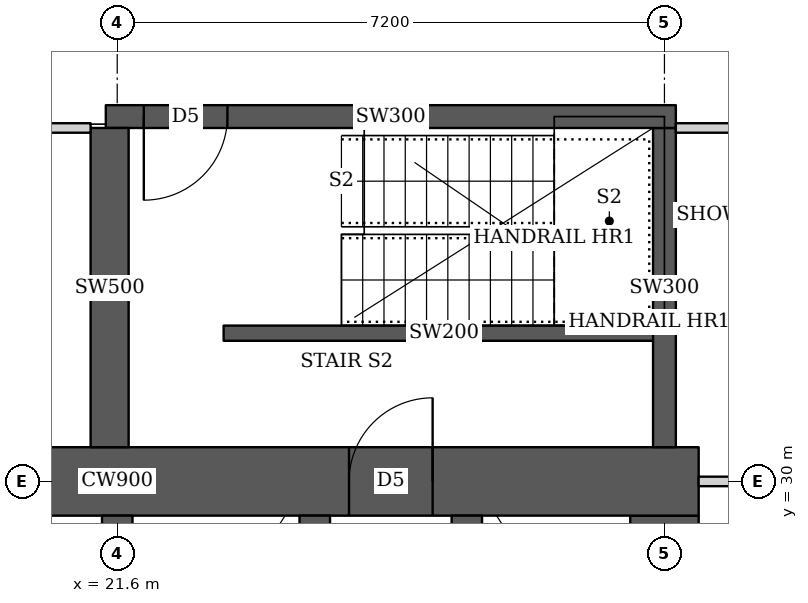
"""IFC4 building model, lengths in metres.
Left out: names, types, materials, properties, quantities, classifications, styles, units other than length and angle.
Written with IfcOpenShell. Run it as: python <this file> out.ifc"""

import sys

from ifc_helpers import new_model, si_unit, direction, frame, frame_2d, origin, place, context, subcontext, project, spatial, rectangle, extrude, element, fill, save


model = new_model("IFC4")
c1 = context("Model", 3, precision=1e-05, world=origin(), true_north=direction((0.0, 1.0)))
c2 = subcontext(c1, "Body", "Model", "MODEL_VIEW")
j1 = project(units=[si_unit("LENGTHUNIT", "METRE"), si_unit("PLANEANGLEUNIT", "RADIAN")], contexts=[c1])
p1 = place(None, origin())
s1 = spatial("IfcSite", under=j1, at=p1, CompositionType="ELEMENT")
p2 = place(p1, origin())
s2 = spatial("IfcBuilding", under=s1, at=p2, CompositionType="ELEMENT")
p3 = place(p2, frame((0.0, 0.0, 23.75)))
s3 = spatial("IfcBuildingStorey", under=s2, at=p3, CompositionType="ELEMENT", Elevation=23.75)
p4 = place(p3, frame((13.95, 30.0, 0.0), z_axis=(0.0, 0.0, 1.0), x_axis=(1.0, 0.0, 0.0)))
e1 = element("IfcWall", 1, at=p4, inside=s3, PredefinedType="SHEAR", context=c2, shape_type="SweptSolid", body=[
    extrude(rectangle(XDim=15.3, YDim=0.9, at=frame_2d((7.65, 0.0))), origin(), (0.0, 0.0, 1.0), 3.75),
])
p5 = place(p4, frame((4.45, 0.0, 0.0)))
e2 = element("IfcOpeningElement", 2, at=p5, cuts=e1, PredefinedType="OPENING", context=c2, shape_type="SweptSolid", body=[
    extrude(rectangle(XDim=1.8, YDim=2.1, at=frame_2d((0.9, 1.05))), frame((0.0, 0.46, 0.0), z_axis=(0.0, -1.0, 0.0), x_axis=(1.0, 0.0, 0.0)), (0.0, 0.0, 1.0), 0.92),
])
p6 = place(p4, frame((10.7, 0.0, 0.0)))
e3 = element("IfcOpeningElement", 3, at=p6, cuts=e1, PredefinedType="OPENING", context=c2, shape_type="SweptSolid", body=[
    extrude(rectangle(XDim=1.1, YDim=2.1, at=frame_2d((0.55, 1.05))), frame((0.0, 0.46, 0.0), z_axis=(0.0, -1.0, 0.0), x_axis=(1.0, 0.0, 0.0)), (0.0, 0.0, 1.0), 0.92),
])
p7 = place(p3, frame((28.8, 15.45, 0.0), z_axis=(0.0, 0.0, 1.0), x_axis=(0.0, 1.0, 0.0)))
e4 = element("IfcWall", 4, at=p7, inside=s3, PredefinedType="SHEAR", context=c2, shape_type="SweptSolid", body=[
    extrude(rectangle(XDim=14.1, YDim=0.9, at=frame_2d((7.05, 0.0))), origin(), (0.0, 0.0, 1.0), 3.75),
])
for number, where, z_axis, x_axis in (
    (5, (21.6, 15.45, 0.0), (0.0, 0.0, 1.0), (0.0, 1.0, 0.0)),
    (6, (24.2, 15.45, 0.0), (0.0, 0.0, 1.0), (0.0, 1.0, 0.0)),
):
    element("IfcWall", number, at=place(p3, frame(where, z_axis=z_axis, x_axis=x_axis)), inside=s3, PredefinedType="SHEAR", context=c2, shape_type="SweptSolid", body=[
        extrude(rectangle(XDim=14.1, YDim=0.4, at=frame_2d((7.05, 0.0))), origin(), (0.0, 0.0, 1.0), 3.75),
    ])
p8 = place(p3, frame((26.2, 26.45, 0.0), z_axis=(0.0, 0.0, 1.0), x_axis=(0.0, 1.0, 0.0)))
e7 = element("IfcWall", 7, at=p8, inside=s3, PredefinedType="SHEAR", context=c2, shape_type="SweptSolid", body=[
    extrude(rectangle(XDim=3.1, YDim=0.4, at=frame_2d((1.55, 0.0))), origin(), (0.0, 0.0, 1.0), 3.75),
])
p9 = place(p8, frame((1.075, 0.0, 0.0)))
e8 = element("IfcOpeningElement", 8, at=p9, cuts=e7, PredefinedType="OPENING", context=c2, shape_type="SweptSolid", body=[
    extrude(rectangle(XDim=1.2, YDim=2.1, at=frame_2d((0.6, 1.05))), frame((0.0, 0.21, 0.0), z_axis=(0.0, -1.0, 0.0), x_axis=(1.0, 0.0, 0.0)), (0.0, 0.0, 1.0), 0.42),
])
p10 = place(p3, frame((21.45, 34.8, 0.0), z_axis=(0.0, 0.0, 1.0), x_axis=(1.0, 0.0, 0.0)))
e9 = element("IfcWall", 9, at=p10, inside=s3, PredefinedType="SHEAR", context=c2, shape_type="SweptSolid", body=[
    extrude(rectangle(XDim=7.5, YDim=0.3, at=frame_2d((3.75, 0.0))), origin(), (0.0, 0.0, 1.0), 3.75),
])
p11 = place(p10, frame((0.5, 0.0, 0.0)))
e10 = element("IfcOpeningElement", 10, at=p11, cuts=e9, PredefinedType="OPENING", context=c2, shape_type="SweptSolid", body=[
    extrude(rectangle(XDim=1.1, YDim=2.1, at=frame_2d((0.55, 1.05))), frame((0.0, 0.16, 0.0), z_axis=(0.0, -1.0, 0.0), x_axis=(1.0, 0.0, 0.0)), (0.0, 0.0, 1.0), 0.32),
])
p12 = place(p3, frame((21.5, 30.45, 0.0), z_axis=(0.0, 0.0, 1.0), x_axis=(0.0, 1.0, 0.0)))
e11 = element("IfcWall", 11, at=p12, inside=s3, PredefinedType="SHEAR", context=c2, shape_type="SweptSolid", body=[
    extrude(rectangle(XDim=4.2, YDim=0.5, at=frame_2d((2.1, 0.0))), origin(), (0.0, 0.0, 1.0), 3.75),
])
p13 = place(p3, frame((28.8, 30.45, 0.0), z_axis=(0.0, 0.0, 1.0), x_axis=(0.0, 1.0, 0.0)))
e12 = element("IfcWall", 12, at=p13, inside=s3, PredefinedType="SHEAR", context=c2, shape_type="SweptSolid", body=[
    extrude(rectangle(XDim=4.2, YDim=0.3, at=frame_2d((2.1, 0.0))), origin(), (0.0, 0.0, 1.0), 3.75),
])
p14 = place(p3, frame((10.413, 34.65, 0.0), z_axis=(0.0, 0.0, 1.0), x_axis=(1.0, 0.0, 0.0)))
e13 = element("IfcWall", 13, at=p14, inside=s3, PredefinedType="PARTITIONING", context=c2, shape_type="SweptSolid", body=[
    extrude(rectangle(XDim=10.837, YDim=0.125, at=frame_2d((5.418, 0.0))), origin(), (0.0, 0.0, 1.0), 3.5),
])
p15 = place(p14, frame((7.487, 0.0, 0.0)))
e14 = element("IfcOpeningElement", 14, at=p15, cuts=e13, PredefinedType="OPENING", context=c2, shape_type="SweptSolid", body=[
    extrude(rectangle(XDim=1.8, YDim=2.1, at=frame_2d((0.9, 1.05))), frame((0.0, 0.073, 0.0), z_axis=(0.0, -1.0, 0.0), x_axis=(1.0, 0.0, 0.0)), (0.0, 0.0, 1.0), 0.145),
])
p16 = place(p3, frame((28.95, 34.65, 0.0), z_axis=(0.0, 0.0, 1.0), x_axis=(1.0, 0.0, 0.0)))
e15 = element("IfcWall", 15, at=p16, inside=s3, PredefinedType="PARTITIONING", context=c2, shape_type="SweptSolid", body=[
    extrude(rectangle(XDim=4.381, YDim=0.125, at=frame_2d((2.19, 0.0))), origin(), (0.0, 0.0, 1.0), 3.5),
])
p17 = place(p3, frame((29.25, 30.0, 0.0), z_axis=(0.0, 0.0, 1.0), x_axis=(1.0, 0.0, 0.0)))
e16 = element("IfcWall", 16, at=p17, inside=s3, PredefinedType="PARTITIONING", context=c2, shape_type="SweptSolid", body=[
    extrude(rectangle(XDim=2.849, YDim=0.125, at=frame_2d((1.425, 0.0))), origin(), (0.0, 0.0, 1.0), 3.5),
])
p18 = place(p3, frame((23.0, 31.95, 0.0), z_axis=(0.0, 0.0, 1.0), x_axis=(1.0, 0.0, 0.0)))
e17 = element("IfcWall", 17, at=p18, inside=s3, PredefinedType="SHEAR", context=c2, shape_type="SweptSolid", body=[
    extrude(rectangle(XDim=5.8, YDim=0.2, at=frame_2d((2.9, 0.0))), origin(), (0.0, 0.0, 1.0), 3.75),
])
p19 = place(p6, origin())
e18 = element("IfcDoor", 18, at=p19, inside=s3, OperationType="SINGLE_SWING_RIGHT", PredefinedType="DOOR", context=c2, shape_type="SweptSolid", body=[
    extrude(rectangle(XDim=1.1, YDim=2.1, at=frame_2d((0.55, 1.05))), frame((0.0, 0.025, 0.0), z_axis=(0.0, -1.0, 0.0), x_axis=(1.0, 0.0, 0.0)), (0.0, 0.0, 1.0), 0.05),
])
fill(e3, e18)
p20 = place(p11, origin())
e19 = element("IfcDoor", 19, at=p20, inside=s3, OperationType="SINGLE_SWING_RIGHT", PredefinedType="DOOR", context=c2, shape_type="SweptSolid", body=[
    extrude(rectangle(XDim=1.1, YDim=2.1, at=frame_2d((0.55, 1.05))), frame((0.0, 0.025, 0.0), z_axis=(0.0, -1.0, 0.0), x_axis=(1.0, 0.0, 0.0)), (0.0, 0.0, 1.0), 0.05),
])
fill(e10, e19)
save(model, sys.argv[1])
